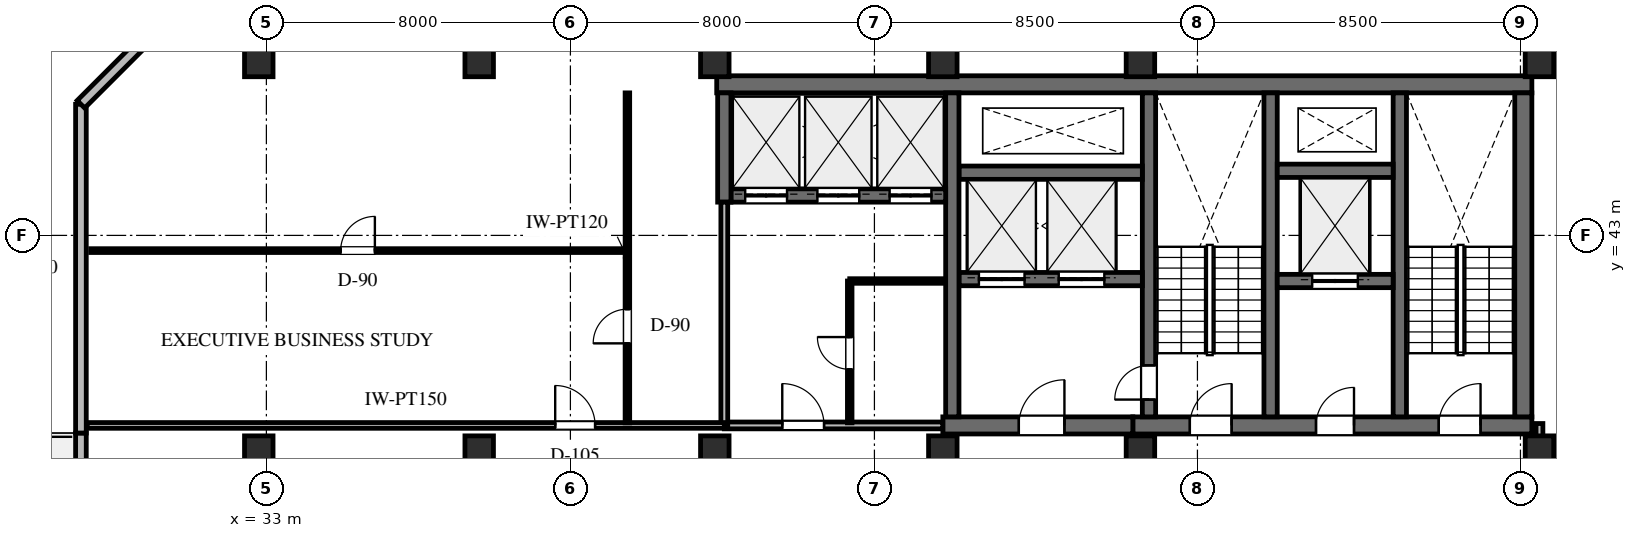
"""IFC4 building model, lengths in metres.
Left out: names, types, materials, properties, quantities, classifications, styles, units other than length and angle.
Written with IfcOpenShell. Run it as: python <this file> out.ifc"""

import sys

from ifc_helpers import new_model, si_unit, direction, frame, frame_2d, origin, origin_2d, place, context, subcontext, project, spatial, rectangle, extrude, element, fill, save


model = new_model("IFC4")
c1 = context("Model", 3, precision=1e-05, world=origin(), true_north=direction((0.0, 1.0)))
c2 = subcontext(c1, "Body", "Model", "MODEL_VIEW")
j1 = project(units=[si_unit("LENGTHUNIT", "METRE"), si_unit("PLANEANGLEUNIT", "RADIAN")], contexts=[c1])
p1 = place(None, origin())
s1 = spatial("IfcSite", under=j1, at=p1, CompositionType="ELEMENT")
p2 = place(p1, origin())
s2 = spatial("IfcBuilding", under=s1, at=p2, CompositionType="ELEMENT")
p3 = place(p2, frame((0.0, 0.0, 263.4)))
s3 = spatial("IfcBuildingStorey", under=s2, at=p3, CompositionType="ELEMENT", Elevation=263.4)
p4 = place(p3, frame((44.85, 46.975, 0.0), z_axis=(0.0, 0.0, 1.0), x_axis=(1.0, 0.0, 0.0)))
e1 = element("IfcWall", 1, at=p4, inside=s3, PredefinedType="SHEAR", context=c2, shape_type="SweptSolid", body=[
    extrude(rectangle(XDim=21.45, YDim=0.45, at=frame_2d((10.725, 0.0))), origin(), (0.0, 0.0, 1.0), 3.6),
])
p5 = place(p3, frame((55.8, 38.0, 0.0), z_axis=(0.0, 0.0, 1.0), x_axis=(1.0, 0.0, 0.0)))
e2 = element("IfcWall", 2, at=p5, inside=s3, PredefinedType="SHEAR", context=c2, shape_type="SweptSolid", body=[
    extrude(rectangle(XDim=10.5, YDim=0.45, at=frame_2d((5.25, 0.0))), origin(), (0.0, 0.0, 1.0), 3.6),
])
p6 = place(p5, frame((1.5, 0.0, 0.0)))
e3 = element("IfcOpeningElement", 3, at=p6, cuts=e2, PredefinedType="OPENING", context=c2, shape_type="SweptSolid", body=[
    extrude(rectangle(XDim=1.1, YDim=2.2, at=frame_2d((0.55, 1.1))), frame((0.0, 0.235, 0.0), z_axis=(0.0, -1.0, 0.0), x_axis=(1.0, 0.0, 0.0)), (0.0, 0.0, 1.0), 0.47),
])
p7 = place(p5, frame((4.82, 0.0, 0.0)))
e4 = element("IfcOpeningElement", 4, at=p7, cuts=e2, PredefinedType="OPENING", context=c2, shape_type="SweptSolid", body=[
    extrude(rectangle(XDim=1.0, YDim=2.15, at=frame_2d((0.5, 1.075))), frame((0.0, 0.235, 0.0), z_axis=(0.0, -1.0, 0.0), x_axis=(1.0, 0.0, 0.0)), (0.0, 0.0, 1.0), 0.47),
])
p8 = place(p5, frame((8.05, 0.0, 0.0)))
e5 = element("IfcOpeningElement", 5, at=p8, cuts=e2, PredefinedType="OPENING", context=c2, shape_type="SweptSolid", body=[
    extrude(rectangle(XDim=1.1, YDim=2.2, at=frame_2d((0.55, 1.1))), frame((0.0, 0.235, 0.0), z_axis=(0.0, -1.0, 0.0), x_axis=(1.0, 0.0, 0.0)), (0.0, 0.0, 1.0), 0.47),
])
p9 = place(p3, frame((66.075, 38.225, 0.0), z_axis=(0.0, 0.0, 1.0), x_axis=(0.0, 1.0, 0.0)))
e6 = element("IfcWall", 6, at=p9, inside=s3, PredefinedType="SHEAR", context=c2, shape_type="SweptSolid", body=[
    extrude(rectangle(XDim=8.525, YDim=0.45, at=frame_2d((4.262, 0.0))), origin(), (0.0, 0.0, 1.0), 3.6),
])
for number, where, z_axis, x_axis in (
    (7, (62.825, 38.225, 0.0), (0.0, 0.0, 1.0), (0.0, 1.0, 0.0)),
    (8, (59.425, 38.225, 0.0), (0.0, 0.0, 1.0), (0.0, 1.0, 0.0)),
):
    element("IfcWall", number, at=place(p3, frame(where, z_axis=z_axis, x_axis=x_axis)), inside=s3, PredefinedType="SHEAR", context=c2, shape_type="SweptSolid", body=[
        extrude(rectangle(XDim=8.525, YDim=0.35, at=frame_2d((4.262, 0.0))), origin(), (0.0, 0.0, 1.0), 3.6),
    ])
p10 = place(p3, frame((56.225, 38.225, 0.0), z_axis=(0.0, 0.0, 1.0), x_axis=(0.0, 1.0, 0.0)))
e9 = element("IfcWall", 9, at=p10, inside=s3, PredefinedType="SHEAR", context=c2, shape_type="SweptSolid", body=[
    extrude(rectangle(XDim=8.525, YDim=0.35, at=frame_2d((4.262, 0.0))), origin(), (0.0, 0.0, 1.0), 3.6),
])
p11 = place(p10, frame((0.455, 0.0, 0.0)))
e10 = element("IfcOpeningElement", 10, at=p11, cuts=e9, PredefinedType="OPENING", context=c2, shape_type="SweptSolid", body=[
    extrude(rectangle(XDim=0.9, YDim=2.15, at=frame_2d((0.45, 1.075))), frame((0.0, 0.185, 0.0), z_axis=(0.0, -1.0, 0.0), x_axis=(1.0, 0.0, 0.0)), (0.0, 0.0, 1.0), 0.37),
])
p12 = place(p3, frame((59.6, 41.8, 0.0), z_axis=(0.0, 0.0, 1.0), x_axis=(1.0, 0.0, 0.0)))
e11 = element("IfcWall", 11, at=p12, inside=s3, PredefinedType="SHEAR", context=c2, shape_type="SweptSolid", body=[
    extrude(rectangle(XDim=3.05, YDim=0.35, at=frame_2d((1.525, 0.0))), origin(), (0.0, 0.0, 1.0), 3.6),
])
p13 = place(p12, frame((0.92, 0.0, 0.0)))
e12 = element("IfcOpeningElement", 12, at=p13, cuts=e11, PredefinedType="OPENING", context=c2, shape_type="SweptSolid", body=[
    extrude(rectangle(XDim=1.2, YDim=2.2, at=frame_2d((0.6, 1.1))), frame((0.0, 0.185, 0.0), z_axis=(0.0, -1.0, 0.0), x_axis=(1.0, 0.0, 0.0)), (0.0, 0.0, 1.0), 0.37),
])
p14 = place(p3, frame((59.6, 44.7, 0.0), z_axis=(0.0, 0.0, 1.0), x_axis=(1.0, 0.0, 0.0)))
e13 = element("IfcWall", 13, at=p14, inside=s3, PredefinedType="SHEAR", context=c2, shape_type="SweptSolid", body=[
    extrude(rectangle(XDim=3.05, YDim=0.35, at=frame_2d((1.525, 0.0))), origin(), (0.0, 0.0, 1.0), 3.6),
])
p15 = place(p3, frame((50.8, 38.0, 0.0), z_axis=(0.0, 0.0, 1.0), x_axis=(1.0, 0.0, 0.0)))
e14 = element("IfcWall", 14, at=p15, inside=s3, PredefinedType="SHEAR", context=c2, shape_type="SweptSolid", body=[
    extrude(rectangle(XDim=5.0, YDim=0.45, at=frame_2d((2.5, 0.0))), origin(), (0.0, 0.0, 1.0), 3.6),
])
p16 = place(p15, frame((2.0, 0.0, 0.0)))
e15 = element("IfcOpeningElement", 15, at=p16, cuts=e14, PredefinedType="OPENING", context=c2, shape_type="SweptSolid", body=[
    extrude(rectangle(XDim=1.2, YDim=2.2, at=frame_2d((0.6, 1.1))), frame((0.0, 0.235, 0.0), z_axis=(0.0, -1.0, 0.0), x_axis=(1.0, 0.0, 0.0)), (0.0, 0.0, 1.0), 0.47),
])
p17 = place(p3, frame((51.225, 41.85, 0.0), z_axis=(0.0, 0.0, 1.0), x_axis=(1.0, 0.0, 0.0)))
e16 = element("IfcWall", 16, at=p17, inside=s3, PredefinedType="SHEAR", context=c2, shape_type="SweptSolid", body=[
    extrude(rectangle(XDim=4.825, YDim=0.35, at=frame_2d((2.413, 0.0))), origin(), (0.0, 0.0, 1.0), 3.6),
])
p18 = place(p17, frame((0.525, 0.0, 0.0)))
e17 = element("IfcOpeningElement", 17, at=p18, cuts=e16, PredefinedType="OPENING", context=c2, shape_type="SweptSolid", body=[
    extrude(rectangle(XDim=1.2, YDim=2.2, at=frame_2d((0.6, 1.1))), frame((0.0, 0.185, 0.0), z_axis=(0.0, -1.0, 0.0), x_axis=(1.0, 0.0, 0.0)), (0.0, 0.0, 1.0), 0.37),
])
p19 = place(p17, frame((2.625, 0.0, 0.0)))
e18 = element("IfcOpeningElement", 18, at=p19, cuts=e16, PredefinedType="OPENING", context=c2, shape_type="SweptSolid", body=[
    extrude(rectangle(XDim=1.2, YDim=2.2, at=frame_2d((0.6, 1.1))), frame((0.0, 0.185, 0.0), z_axis=(0.0, -1.0, 0.0), x_axis=(1.0, 0.0, 0.0)), (0.0, 0.0, 1.0), 0.37),
])
p20 = place(p3, frame((51.225, 44.65, 0.0), z_axis=(0.0, 0.0, 1.0), x_axis=(1.0, 0.0, 0.0)))
e19 = element("IfcWall", 19, at=p20, inside=s3, PredefinedType="SHEAR", context=c2, shape_type="SweptSolid", body=[
    extrude(rectangle(XDim=4.825, YDim=0.35, at=frame_2d((2.413, 0.0))), origin(), (0.0, 0.0, 1.0), 3.6),
])
p21 = place(p3, frame((51.05, 38.225, 0.0), z_axis=(0.0, 0.0, 1.0), x_axis=(0.0, 1.0, 0.0)))
e20 = element("IfcWall", 20, at=p21, inside=s3, PredefinedType="SHEAR", context=c2, shape_type="SweptSolid", body=[
    extrude(rectangle(XDim=8.525, YDim=0.35, at=frame_2d((4.262, 0.0))), origin(), (0.0, 0.0, 1.0), 3.6),
])
p22 = place(p3, frame((45.225, 44.05, 0.0), z_axis=(0.0, 0.0, 1.0), x_axis=(1.0, 0.0, 0.0)))
e21 = element("IfcWall", 21, at=p22, inside=s3, PredefinedType="SHEAR", context=c2, shape_type="SweptSolid", body=[
    extrude(rectangle(XDim=5.65, YDim=0.35, at=frame_2d((2.825, 0.0))), origin(), (0.0, 0.0, 1.0), 3.6),
])
p23 = place(p22, frame((0.375, 0.0, 0.0)))
e22 = element("IfcOpeningElement", 22, at=p23, cuts=e21, PredefinedType="OPENING", context=c2, shape_type="SweptSolid", body=[
    extrude(rectangle(XDim=1.1, YDim=2.2, at=frame_2d((0.55, 1.1))), frame((0.0, 0.185, 0.0), z_axis=(0.0, -1.0, 0.0), x_axis=(1.0, 0.0, 0.0)), (0.0, 0.0, 1.0), 0.37),
])
p24 = place(p22, frame((2.275, 0.0, 0.0)))
e23 = element("IfcOpeningElement", 23, at=p24, cuts=e21, PredefinedType="OPENING", context=c2, shape_type="SweptSolid", body=[
    extrude(rectangle(XDim=1.1, YDim=2.2, at=frame_2d((0.55, 1.1))), frame((0.0, 0.185, 0.0), z_axis=(0.0, -1.0, 0.0), x_axis=(1.0, 0.0, 0.0)), (0.0, 0.0, 1.0), 0.37),
])
p25 = place(p22, frame((4.175, 0.0, 0.0)))
e24 = element("IfcOpeningElement", 24, at=p25, cuts=e21, PredefinedType="OPENING", context=c2, shape_type="SweptSolid", body=[
    extrude(rectangle(XDim=1.1, YDim=2.2, at=frame_2d((0.55, 1.1))), frame((0.0, 0.185, 0.0), z_axis=(0.0, -1.0, 0.0), x_axis=(1.0, 0.0, 0.0)), (0.0, 0.0, 1.0), 0.37),
])
p26 = place(p3, frame((45.05, 43.875, 0.0), z_axis=(0.0, 0.0, 1.0), x_axis=(0.0, 1.0, 0.0)))
e25 = element("IfcWall", 25, at=p26, inside=s3, PredefinedType="SHEAR", context=c2, shape_type="SweptSolid", body=[
    extrude(rectangle(XDim=2.875, YDim=0.35, at=frame_2d((1.438, 0.0))), origin(), (0.0, 0.0, 1.0), 3.6),
])
for number, where, z_axis, x_axis in (
    (26, (66.5, 47.55, 0.0), (0.0, 0.0, 1.0), (1.0, 0.0, 0.0)),
    (27, (56.0, 47.55, 0.0), (0.0, 0.0, 1.0), (1.0, 0.0, 0.0)),
    (28, (66.5, 37.35, 0.0), (0.0, 0.0, 1.0), (1.0, 0.0, 0.0)),
    (29, (56.0, 37.35, 0.0), (0.0, 0.0, 1.0), (1.0, 0.0, 0.0)),
    (30, (50.8, 47.55, 0.0), (0.0, 0.0, 1.0), (1.0, 0.0, 0.0)),
    (31, (50.8, 37.35, 0.0), (0.0, 0.0, 1.0), (1.0, 0.0, 0.0)),
    (32, (44.8, 37.35, 0.0), (0.0, 0.0, 1.0), (1.0, 0.0, 0.0)),
    (33, (44.8, 47.55, 0.0), (0.0, 0.0, 1.0), (1.0, 0.0, 0.0)),
    (34, (38.6, 37.35, 0.0), (0.0, 0.0, 1.0), (1.0, 0.0, 0.0)),
    (35, (38.6, 47.55, 0.0), (0.0, 0.0, 1.0), (1.0, 0.0, 0.0)),
    (36, (32.8, 37.35, 0.0), (0.0, 0.0, 1.0), (1.0, 0.0, 0.0)),
    (37, (32.8, 47.55, 0.0), (0.0, 0.0, 1.0), (1.0, 0.0, 0.0)),
):
    element("IfcColumn", number, at=place(p3, frame(where, z_axis=z_axis, x_axis=x_axis)), inside=s3, PredefinedType="COLUMN", context=c2, shape_type="SweptSolid", body=[
        extrude(rectangle(XDim=0.75, YDim=0.75, at=origin_2d()), origin(), (0.0, 0.0, 1.0), 3.6),
    ])
p27 = place(p3, frame((28.12, 20.45, 0.0), z_axis=(0.0, 0.0, 1.0), x_axis=(0.0, 1.0, 0.0)))
e38 = element("IfcWall", 38, at=p27, inside=s3, PredefinedType="STANDARD", context=c2, shape_type="SweptSolid", body=[
    extrude(rectangle(XDim=17.35, YDim=0.28, at=frame_2d((8.675, 0.0))), origin(), (0.0, 0.0, 1.0), 3.36),
])
p28 = place(p27, frame((8.065, 0.0, 0.0)))
e39 = element("IfcOpeningElement", 39, at=p28, cuts=e38, PredefinedType="OPENING", context=c2, shape_type="SweptSolid", body=[
    extrude(rectangle(XDim=1.1, YDim=2.2, at=frame_2d((0.55, 1.1))), frame((0.0, 0.15, 0.0), z_axis=(0.0, -1.0, 0.0), x_axis=(1.0, 0.0, 0.0)), (0.0, 0.0, 1.0), 0.3),
])
p29 = place(p27, frame((2.899, 0.0, 0.65)))
e40 = element("IfcOpeningElement", 40, at=p29, cuts=e38, PredefinedType="OPENING", context=c2, shape_type="SweptSolid", body=[
    extrude(rectangle(XDim=1.8, YDim=2.1, at=frame_2d((0.9, 1.05))), frame((0.0, 0.15, 0.0), z_axis=(0.0, -1.0, 0.0), x_axis=(1.0, 0.0, 0.0)), (0.0, 0.0, 1.0), 0.3),
])
p30 = place(p3, frame((28.12, 37.8, 0.0), z_axis=(0.0, 0.0, 1.0), x_axis=(0.0, 1.0, 0.0)))
e41 = element("IfcWall", 41, at=p30, inside=s3, PredefinedType="STANDARD", context=c2, shape_type="SweptSolid", body=[
    extrude(rectangle(XDim=8.65, YDim=0.28, at=frame_2d((4.325, 0.0))), origin(), (0.0, 0.0, 1.0), 3.36),
])
p31 = place(p3, frame((28.12, 46.45, 0.0), z_axis=(0.0, 0.0, 1.0), x_axis=(0.707106781187, 0.707106781187, 0.0)))
e42 = element("IfcWall", 42, at=p31, inside=s3, PredefinedType="STANDARD", context=c2, shape_type="SweptSolid", body=[
    extrude(rectangle(XDim=2.729, YDim=0.28, at=frame_2d((1.365, 0.0))), origin(), (0.0, 0.0, 1.0), 3.36),
])
p32 = place(p3, frame((45.05, 38.0, 0.0), z_axis=(0.0, 0.0, 1.0), x_axis=(1.0, 0.0, 0.0)))
e43 = element("IfcWall", 43, at=p32, inside=s3, PredefinedType="STANDARD", context=c2, shape_type="SweptSolid", body=[
    extrude(rectangle(XDim=5.75, YDim=0.18, at=frame_2d((2.875, 0.0))), origin(), (0.0, 0.0, 1.0), 2.664),
])
p33 = place(p32, frame((1.525, 0.0, 0.0)))
e44 = element("IfcOpeningElement", 44, at=p33, cuts=e43, PredefinedType="OPENING", context=c2, shape_type="SweptSolid", body=[
    extrude(rectangle(XDim=1.1, YDim=2.2, at=frame_2d((0.55, 1.1))), frame((0.0, 0.1, 0.0), z_axis=(0.0, -1.0, 0.0), x_axis=(1.0, 0.0, 0.0)), (0.0, 0.0, 1.0), 0.2),
])
p34 = place(p3, frame((48.35, 38.068, 0.0), z_axis=(0.0, 0.0, 1.0), x_axis=(0.0, 1.0, 0.0)))
e45 = element("IfcWall", 45, at=p34, inside=s3, PredefinedType="PARTITIONING", context=c2, shape_type="SweptSolid", body=[
    extrude(rectangle(XDim=3.732, YDim=0.12, at=frame_2d((1.866, 0.0))), origin(), (0.0, 0.0, 1.0), 3.36),
])
p35 = place(p34, frame((1.407, 0.0, 0.0)))
e46 = element("IfcOpeningElement", 46, at=p35, cuts=e45, PredefinedType="OPENING", context=c2, shape_type="SweptSolid", body=[
    extrude(rectangle(XDim=0.85, YDim=2.1, at=frame_2d((0.425, 1.05))), frame((0.0, 0.07, 0.0), z_axis=(0.0, -1.0, 0.0), x_axis=(1.0, 0.0, 0.0)), (0.0, 0.0, 1.0), 0.14),
])
p36 = place(p3, frame((48.35, 41.8, 0.0), z_axis=(0.0, 0.0, 1.0), x_axis=(1.0, 0.0, 0.0)))
e47 = element("IfcWall", 47, at=p36, inside=s3, PredefinedType="PARTITIONING", context=c2, shape_type="SweptSolid", body=[
    extrude(rectangle(XDim=2.5, YDim=0.12, at=frame_2d((1.25, 0.0))), origin(), (0.0, 0.0, 1.0), 2.664),
])
p37 = place(p3, frame((45.05, 38.0, 0.0), z_axis=(0.0, 0.0, 1.0), x_axis=(0.0, 1.0, 0.0)))
e48 = element("IfcWall", 48, at=p37, inside=s3, PredefinedType="STANDARD", context=c2, shape_type="SweptSolid", body=[
    extrude(rectangle(XDim=5.875, YDim=0.18, at=frame_2d((2.938, 0.0))), origin(), (0.0, 0.0, 1.0), 2.664),
])
p38 = place(p3, frame((28.285, 38.0, 0.0), z_axis=(0.0, 0.0, 1.0), x_axis=(1.0, 0.0, 0.0)))
e49 = element("IfcWall", 49, at=p38, inside=s3, PredefinedType="PARTITIONING", context=c2, shape_type="SweptSolid", body=[
    extrude(rectangle(XDim=16.765, YDim=0.15, at=frame_2d((8.383, 0.0))), origin(), (0.0, 0.0, 1.0), 2.664),
])
p39 = place(p38, frame((12.315, 0.0, 0.0)))
e50 = element("IfcOpeningElement", 50, at=p39, cuts=e49, PredefinedType="OPENING", context=c2, shape_type="SweptSolid", body=[
    extrude(rectangle(XDim=1.05, YDim=2.2, at=frame_2d((0.525, 1.1))), frame((0.0, 0.085, 0.0), z_axis=(0.0, -1.0, 0.0), x_axis=(1.0, 0.0, 0.0)), (0.0, 0.0, 1.0), 0.17),
])
p40 = place(p3, frame((42.5, 38.068, 0.0), z_axis=(0.0, 0.0, 1.0), x_axis=(0.0, 1.0, 0.0)))
e51 = element("IfcWall", 51, at=p40, inside=s3, PredefinedType="PARTITIONING", context=c2, shape_type="SweptSolid", body=[
    extrude(rectangle(XDim=8.682, YDim=0.12, at=frame_2d((4.341, 0.0))), origin(), (0.0, 0.0, 1.0), 3.36),
])
p41 = place(p40, frame((2.091, 0.0, 0.0)))
e52 = element("IfcOpeningElement", 52, at=p41, cuts=e51, PredefinedType="OPENING", context=c2, shape_type="SweptSolid", body=[
    extrude(rectangle(XDim=0.9, YDim=2.1, at=frame_2d((0.45, 1.05))), frame((0.0, 0.07, 0.0), z_axis=(0.0, -1.0, 0.0), x_axis=(1.0, 0.0, 0.0)), (0.0, 0.0, 1.0), 0.14),
])
p42 = place(p3, frame((28.378, 42.6, 0.0), z_axis=(0.0, 0.0, 1.0), x_axis=(1.0, 0.0, 0.0)))
e53 = element("IfcWall", 53, at=p42, inside=s3, PredefinedType="PARTITIONING", context=c2, shape_type="SweptSolid", body=[
    extrude(rectangle(XDim=14.054, YDim=0.1, at=frame_2d((7.027, 0.0))), origin(), (0.0, 0.0, 1.0), 2.664),
])
p43 = place(p42, frame((6.577, 0.0, 0.0)))
e54 = element("IfcOpeningElement", 54, at=p43, cuts=e53, PredefinedType="OPENING", context=c2, shape_type="SweptSolid", body=[
    extrude(rectangle(XDim=0.9, YDim=2.1, at=frame_2d((0.45, 1.05))), frame((0.0, 0.06, 0.0), z_axis=(0.0, -1.0, 0.0), x_axis=(1.0, 0.0, 0.0)), (0.0, 0.0, 1.0), 0.12),
])
p44 = place(p3, frame((66.5, 34.468, 0.0), z_axis=(0.0, 0.0, 1.0), x_axis=(0.0, 1.0, 0.0)))
e55 = element("IfcWall", 55, at=p44, inside=s3, PredefinedType="STANDARD", context=c2, shape_type="SweptSolid", body=[
    extrude(rectangle(XDim=3.582, YDim=0.18, at=frame_2d((1.791, 0.0))), origin(), (0.0, 0.0, 1.0), 2.664),
])
p45 = place(p6, origin())
e56 = element("IfcDoor", 56, at=p45, inside=s3, OperationType="SINGLE_SWING_RIGHT", PredefinedType="DOOR", context=c2, shape_type="SweptSolid", body=[
    extrude(rectangle(XDim=1.1, YDim=2.2, at=frame_2d((0.55, 1.1))), frame((0.0, 0.025, 0.0), z_axis=(0.0, -1.0, 0.0), x_axis=(1.0, 0.0, 0.0)), (0.0, 0.0, 1.0), 0.05),
])
fill(e3, e56)
p46 = place(p7, origin())
e57 = element("IfcDoor", 57, at=p46, inside=s3, OperationType="SINGLE_SWING_RIGHT", PredefinedType="DOOR", context=c2, shape_type="SweptSolid", body=[
    extrude(rectangle(XDim=1.0, YDim=2.15, at=frame_2d((0.5, 1.075))), frame((0.0, 0.025, 0.0), z_axis=(0.0, -1.0, 0.0), x_axis=(1.0, 0.0, 0.0)), (0.0, 0.0, 1.0), 0.05),
])
fill(e4, e57)
p47 = place(p8, origin())
e58 = element("IfcDoor", 58, at=p47, inside=s3, OperationType="SINGLE_SWING_RIGHT", PredefinedType="DOOR", context=c2, shape_type="SweptSolid", body=[
    extrude(rectangle(XDim=1.1, YDim=2.2, at=frame_2d((0.55, 1.1))), frame((0.0, 0.025, 0.0), z_axis=(0.0, -1.0, 0.0), x_axis=(1.0, 0.0, 0.0)), (0.0, 0.0, 1.0), 0.05),
])
fill(e5, e58)
p48 = place(p16, origin())
e59 = element("IfcDoor", 59, at=p48, inside=s3, OperationType="SINGLE_SWING_RIGHT", PredefinedType="DOOR", context=c2, shape_type="SweptSolid", body=[
    extrude(rectangle(XDim=1.2, YDim=2.2, at=frame_2d((0.6, 1.1))), frame((0.0, 0.025, 0.0), z_axis=(0.0, -1.0, 0.0), x_axis=(1.0, 0.0, 0.0)), (0.0, 0.0, 1.0), 0.05),
])
fill(e15, e59)
p49 = place(p11, origin())
e60 = element("IfcDoor", 60, at=p49, inside=s3, OperationType="SINGLE_SWING_LEFT", PredefinedType="DOOR", context=c2, shape_type="SweptSolid", body=[
    extrude(rectangle(XDim=0.9, YDim=2.15, at=frame_2d((0.45, 1.075))), frame((0.0, 0.025, 0.0), z_axis=(0.0, -1.0, 0.0), x_axis=(1.0, 0.0, 0.0)), (0.0, 0.0, 1.0), 0.05),
])
fill(e10, e60)
p50 = place(p23, origin())
e61 = element("IfcDoor", 61, at=p50, inside=s3, OperationType="DOUBLE_DOOR_SLIDING", PredefinedType="DOOR", context=c2, shape_type="SweptSolid", body=[
    extrude(rectangle(XDim=1.1, YDim=2.2, at=frame_2d((0.55, 1.1))), frame((0.0, 0.025, 0.0), z_axis=(0.0, -1.0, 0.0), x_axis=(1.0, 0.0, 0.0)), (0.0, 0.0, 1.0), 0.05),
])
fill(e22, e61)
p51 = place(p24, origin())
e62 = element("IfcDoor", 62, at=p51, inside=s3, OperationType="DOUBLE_DOOR_SLIDING", PredefinedType="DOOR", context=c2, shape_type="SweptSolid", body=[
    extrude(rectangle(XDim=1.1, YDim=2.2, at=frame_2d((0.55, 1.1))), frame((0.0, 0.025, 0.0), z_axis=(0.0, -1.0, 0.0), x_axis=(1.0, 0.0, 0.0)), (0.0, 0.0, 1.0), 0.05),
])
fill(e23, e62)
p52 = place(p25, origin())
e63 = element("IfcDoor", 63, at=p52, inside=s3, OperationType="DOUBLE_DOOR_SLIDING", PredefinedType="DOOR", context=c2, shape_type="SweptSolid", body=[
    extrude(rectangle(XDim=1.1, YDim=2.2, at=frame_2d((0.55, 1.1))), frame((0.0, 0.025, 0.0), z_axis=(0.0, -1.0, 0.0), x_axis=(1.0, 0.0, 0.0)), (0.0, 0.0, 1.0), 0.05),
])
fill(e24, e63)
p53 = place(p18, origin())
e64 = element("IfcDoor", 64, at=p53, inside=s3, OperationType="DOUBLE_DOOR_SLIDING", PredefinedType="DOOR", context=c2, shape_type="SweptSolid", body=[
    extrude(rectangle(XDim=1.2, YDim=2.2, at=frame_2d((0.6, 1.1))), frame((0.0, 0.025, 0.0), z_axis=(0.0, -1.0, 0.0), x_axis=(1.0, 0.0, 0.0)), (0.0, 0.0, 1.0), 0.05),
])
fill(e17, e64)
p54 = place(p19, origin())
e65 = element("IfcDoor", 65, at=p54, inside=s3, OperationType="DOUBLE_DOOR_SLIDING", PredefinedType="DOOR", context=c2, shape_type="SweptSolid", body=[
    extrude(rectangle(XDim=1.2, YDim=2.2, at=frame_2d((0.6, 1.1))), frame((0.0, 0.025, 0.0), z_axis=(0.0, -1.0, 0.0), x_axis=(1.0, 0.0, 0.0)), (0.0, 0.0, 1.0), 0.05),
])
fill(e18, e65)
p55 = place(p13, origin())
e66 = element("IfcDoor", 66, at=p55, inside=s3, OperationType="DOUBLE_DOOR_SLIDING", PredefinedType="DOOR", context=c2, shape_type="SweptSolid", body=[
    extrude(rectangle(XDim=1.2, YDim=2.2, at=frame_2d((0.6, 1.1))), frame((0.0, 0.025, 0.0), z_axis=(0.0, -1.0, 0.0), x_axis=(1.0, 0.0, 0.0)), (0.0, 0.0, 1.0), 0.05),
])
fill(e12, e66)
p56 = place(p33, origin())
e67 = element("IfcDoor", 67, at=p56, inside=s3, OperationType="SINGLE_SWING_LEFT", PredefinedType="DOOR", context=c2, shape_type="SweptSolid", body=[
    extrude(rectangle(XDim=1.1, YDim=2.2, at=frame_2d((0.55, 1.1))), frame((0.0, 0.025, 0.0), z_axis=(0.0, -1.0, 0.0), x_axis=(1.0, 0.0, 0.0)), (0.0, 0.0, 1.0), 0.05),
])
fill(e44, e67)
p57 = place(p35, origin())
e68 = element("IfcDoor", 68, at=p57, inside=s3, OperationType="SINGLE_SWING_RIGHT", PredefinedType="DOOR", context=c2, shape_type="SweptSolid", body=[
    extrude(rectangle(XDim=0.85, YDim=2.1, at=frame_2d((0.425, 1.05))), frame((0.0, 0.025, 0.0), z_axis=(0.0, -1.0, 0.0), x_axis=(1.0, 0.0, 0.0)), (0.0, 0.0, 1.0), 0.05),
])
fill(e46, e68)
p58 = place(p39, origin())
e69 = element("IfcDoor", 69, at=p58, inside=s3, OperationType="SINGLE_SWING_LEFT", PredefinedType="DOOR", context=c2, shape_type="SweptSolid", body=[
    extrude(rectangle(XDim=1.05, YDim=2.2, at=frame_2d((0.525, 1.1))), frame((0.0, 0.025, 0.0), z_axis=(0.0, -1.0, 0.0), x_axis=(1.0, 0.0, 0.0)), (0.0, 0.0, 1.0), 0.05),
])
fill(e50, e69)
p59 = place(p43, origin())
e70 = element("IfcDoor", 70, at=p59, inside=s3, OperationType="SINGLE_SWING_RIGHT", PredefinedType="DOOR", context=c2, shape_type="SweptSolid", body=[
    extrude(rectangle(XDim=0.9, YDim=2.1, at=frame_2d((0.45, 1.05))), frame((0.0, 0.025, 0.0), z_axis=(0.0, -1.0, 0.0), x_axis=(1.0, 0.0, 0.0)), (0.0, 0.0, 1.0), 0.05),
])
fill(e54, e70)
p60 = place(p41, origin())
e71 = element("IfcDoor", 71, at=p60, inside=s3, OperationType="SINGLE_SWING_LEFT", PredefinedType="DOOR", context=c2, shape_type="SweptSolid", body=[
    extrude(rectangle(XDim=0.9, YDim=2.1, at=frame_2d((0.45, 1.05))), frame((0.0, 0.025, 0.0), z_axis=(0.0, -1.0, 0.0), x_axis=(1.0, 0.0, 0.0)), (0.0, 0.0, 1.0), 0.05),
])
fill(e52, e71)
save(model, sys.argv[1])
